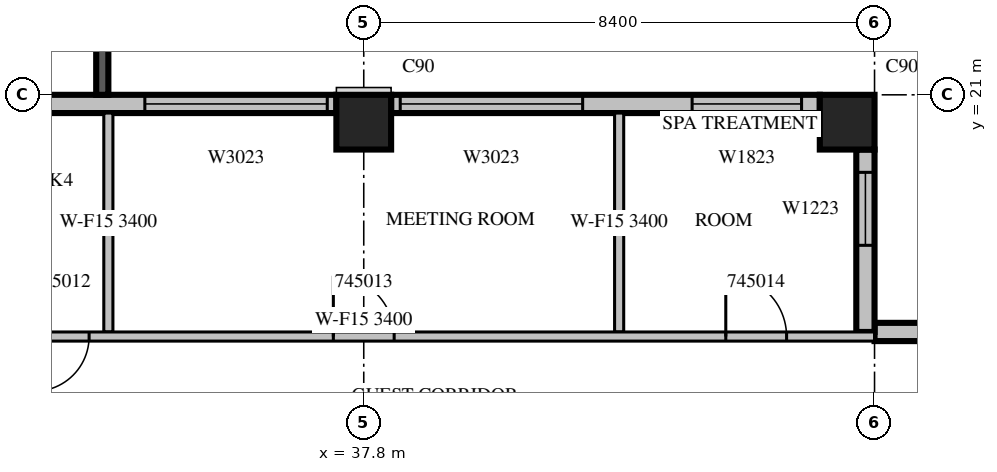
"""IFC4 building model, lengths in metres.
Left out: names, types, materials, properties, quantities, classifications, styles, units other than length and angle.
Written with IfcOpenShell. Run it as: python <this file> out.ifc"""

import sys

from ifc_helpers import new_model, si_unit, direction, frame, frame_2d, origin, origin_2d, place, context, subcontext, project, spatial, rectangle, extrude, source, transform, mapped, element, fill, save


model = new_model("IFC4")
c1 = context("Model", 3, precision=1e-05, world=origin(), true_north=direction((0.0, 1.0)))
c2 = subcontext(c1, "Body", "Model", "MODEL_VIEW")
j1 = project(units=[si_unit("LENGTHUNIT", "METRE"), si_unit("PLANEANGLEUNIT", "RADIAN")], contexts=[c1])
p1 = place(None, origin())
s1 = spatial("IfcSite", under=j1, at=p1, CompositionType="ELEMENT")
p2 = place(p1, origin())
s2 = spatial("IfcBuilding", under=s1, at=p2, CompositionType="ELEMENT")
p3 = place(p2, frame((0.0, 0.0, 204.4)))
s3 = spatial("IfcBuildingStorey", under=s2, at=p3, CompositionType="ELEMENT", Elevation=204.4)
m1 = source(origin(), c2, "Body", "SweptSolid", [
    extrude(rectangle(XDim=0.9, YDim=0.9, at=origin_2d()), origin(), (0.0, 0.0, 1.0), 3.8),
])
for number, where, z_axis, x_axis in (
    (1, (37.8, 20.55, 0.0), (0.0, 0.0, 1.0), (1.0, 0.0, 0.0)),
    (2, (45.75, 20.55, 0.0), (0.0, 0.0, 1.0), (1.0, 0.0, 0.0)),
):
    element("IfcColumn", number, at=place(p3, frame(where, z_axis=z_axis, x_axis=x_axis)), inside=s3, PredefinedType="COLUMN", context=c2, shape_type="MappedRepresentation", body=[
        mapped(m1, transform((0.0, 0.0, 0.0), scale=1.0)),
    ])
p4 = place(p3, frame((53.76, 17.1, 0.0), z_axis=(0.0, 0.0, 1.0), x_axis=(-1.0, 0.0, 0.0)))
e3 = element("IfcWall", 3, at=p4, inside=s3, PredefinedType="STANDARD", context=c2, shape_type="SweptSolid", body=[
    extrude(rectangle(XDim=7.56, YDim=0.3, at=frame_2d((3.78, 0.0))), origin(), (0.0, 0.0, 1.0), 3.4),
])
m2 = source(origin(), c2, "Body", "SweptSolid", [
    extrude(rectangle(XDim=3.6, YDim=2.3, at=frame_2d((1.8, 1.15))), frame((0.0, 0.16, 0.0), z_axis=(0.0, -1.0, 0.0), x_axis=(1.0, 0.0, 0.0)), (0.0, 0.0, 1.0), 0.32),
])
p5 = place(p4, frame((1.14, 0.0, 0.6)))
e4 = element("IfcOpeningElement", 4, at=p5, cuts=e3, PredefinedType="OPENING", context=c2, shape_type="MappedRepresentation", body=[
    mapped(m2, transform((0.0, 0.0, 0.0), scale=1.0)),
])
m3 = source(origin(), c2, "Body", "SweptSolid", [
    extrude(rectangle(XDim=3.0, YDim=0.3, at=frame_2d((1.5, 0.0))), origin(), (0.0, 0.0, 1.0), 3.4),
])
p6 = place(p3, frame((46.05, 17.1, 0.0), z_axis=(0.0, 0.0, 1.0), x_axis=(0.0, 1.0, 0.0)))
e5 = element("IfcWall", 5, at=p6, inside=s3, PredefinedType="STANDARD", context=c2, shape_type="MappedRepresentation", body=[
    mapped(m3, transform((0.0, 0.0, 0.0), scale=1.0)),
])
m4 = source(origin(), c2, "Body", "SweptSolid", [
    extrude(rectangle(XDim=1.2, YDim=2.3, at=frame_2d((0.6, 1.15))), frame((0.0, 0.16, 0.0), z_axis=(0.0, -1.0, 0.0), x_axis=(1.0, 0.0, 0.0)), (0.0, 0.0, 1.0), 0.32),
])
p7 = place(p6, frame((1.425, 0.0, 0.6)))
e6 = element("IfcOpeningElement", 6, at=p7, cuts=e5, PredefinedType="OPENING", context=c2, shape_type="MappedRepresentation", body=[
    mapped(m4, transform((0.0, 0.0, 0.0), scale=1.0)),
])
m5 = source(origin(), c2, "Body", "SweptSolid", [
    extrude(rectangle(XDim=7.05, YDim=0.3, at=frame_2d((3.525, 0.0))), origin(), (0.0, 0.0, 1.0), 3.4),
])
p8 = place(p3, frame((45.3, 20.85, 0.0), z_axis=(0.0, 0.0, 1.0), x_axis=(-1.0, 0.0, 0.0)))
e7 = element("IfcWall", 7, at=p8, inside=s3, PredefinedType="STANDARD", context=c2, shape_type="MappedRepresentation", body=[
    mapped(m5, transform((0.0, 0.0, 0.0), scale=1.0)),
])
m6 = source(origin(), c2, "Body", "SweptSolid", [
    extrude(rectangle(XDim=1.8, YDim=2.3, at=frame_2d((0.9, 1.15))), frame((0.0, 0.16, 0.0), z_axis=(0.0, -1.0, 0.0), x_axis=(1.0, 0.0, 0.0)), (0.0, 0.0, 1.0), 0.32),
])
p9 = place(p8, frame((0.3, 0.0, 0.6)))
e8 = element("IfcOpeningElement", 8, at=p9, cuts=e7, PredefinedType="OPENING", context=c2, shape_type="MappedRepresentation", body=[
    mapped(m6, transform((0.0, 0.0, 0.0), scale=1.0)),
])
m7 = source(origin(), c2, "Body", "SweptSolid", [
    extrude(rectangle(XDim=3.0, YDim=2.3, at=frame_2d((1.5, 1.15))), frame((0.0, 0.16, 0.0), z_axis=(0.0, -1.0, 0.0), x_axis=(1.0, 0.0, 0.0)), (0.0, 0.0, 1.0), 0.32),
])
p10 = place(p8, frame((3.9, 0.0, 0.6)))
e9 = element("IfcOpeningElement", 9, at=p10, cuts=e7, PredefinedType="OPENING", context=c2, shape_type="MappedRepresentation", body=[
    mapped(m7, transform((0.0, 0.0, 0.0), scale=1.0)),
])
m8 = source(origin(), c2, "Body", "SweptSolid", [
    extrude(rectangle(XDim=7.5, YDim=0.3, at=frame_2d((3.75, 0.0))), origin(), (0.0, 0.0, 1.0), 3.4),
])
p11 = place(p3, frame((37.35, 20.85, 0.0), z_axis=(0.0, 0.0, 1.0), x_axis=(-1.0, 0.0, 0.0)))
e10 = element("IfcWall", 10, at=p11, inside=s3, PredefinedType="STANDARD", context=c2, shape_type="MappedRepresentation", body=[
    mapped(m8, transform((0.0, 0.0, 0.0), scale=1.0)),
])
p12 = place(p11, frame((0.15, 0.0, 0.6)))
e11 = element("IfcOpeningElement", 11, at=p12, cuts=e10, PredefinedType="OPENING", context=c2, shape_type="MappedRepresentation", body=[
    mapped(m7, transform((0.0, 0.0, 0.0), scale=1.0)),
])
m9 = source(origin(), c2, "Body", "SweptSolid", [
    extrude(rectangle(XDim=1.0, YDim=2.1, at=frame_2d((0.5, 1.05))), frame((0.0, 0.16, 0.0), z_axis=(0.0, -1.0, 0.0), x_axis=(1.0, 0.0, 0.0)), (0.0, 0.0, 1.0), 0.32),
])
p13 = place(p11, frame((6.05, 0.0, 0.0)))
e12 = element("IfcOpeningElement", 12, at=p13, cuts=e10, PredefinedType="OPENING", context=c2, shape_type="MappedRepresentation", body=[
    mapped(m9, transform((0.0, 0.0, 0.0), scale=1.0)),
])
m10 = source(origin(), c2, "Body", "SweptSolid", [
    extrude(rectangle(XDim=3.9, YDim=0.2, at=frame_2d((1.95, 0.0))), origin(), (0.0, 0.0, 1.0), 3.39),
])
p14 = place(p3, frame((33.5, 21.0, 0.0), z_axis=(0.0, 0.0, 1.0), x_axis=(0.0, 1.0, 0.0)))
e13 = element("IfcWall", 13, at=p14, inside=s3, PredefinedType="SOLIDWALL", context=c2, shape_type="MappedRepresentation", body=[
    mapped(m10, transform((0.0, 0.0, 0.0), scale=1.0)),
])
m11 = source(origin(), c2, "Body", "SweptSolid", [
    extrude(rectangle(XDim=2.4, YDim=2.3, at=frame_2d((1.2, 1.15))), frame((0.0, 0.11, 0.0), z_axis=(0.0, -1.0, 0.0), x_axis=(1.0, 0.0, 0.0)), (0.0, 0.0, 1.0), 0.22),
])
p15 = place(p14, frame((0.75, 0.0, 0.6)))
e14 = element("IfcOpeningElement", 14, at=p15, cuts=e13, PredefinedType="OPENING", context=c2, shape_type="MappedRepresentation", body=[
    mapped(m11, transform((0.0, 0.0, 0.0), scale=1.0)),
])
m12 = source(origin(), c2, "Body", "SweptSolid", [
    extrude(rectangle(XDim=3.6, YDim=0.15, at=frame_2d((1.8, 0.0))), origin(), (0.0, 0.0, 1.0), 3.4),
])
for number, where, z_axis, x_axis in (
    (15, (33.6, 17.1, 0.0), (0.0, 0.0, 1.0), (0.0, 1.0, 0.0)),
    (16, (42.0, 17.1, 0.0), (0.0, 0.0, 1.0), (0.0, 1.0, 0.0)),
):
    element("IfcWall", number, at=place(p3, frame(where, z_axis=z_axis, x_axis=x_axis)), inside=s3, PredefinedType="PARTITIONING", context=c2, shape_type="MappedRepresentation", body=[
        mapped(m12, transform((0.0, 0.0, 0.0), scale=1.0)),
    ])
p16 = place(p3, frame((29.4, 17.025, 0.0), z_axis=(0.0, 0.0, 1.0), x_axis=(1.0, 0.0, 0.0)))
e17 = element("IfcWall", 17, at=p16, inside=s3, PredefinedType="PARTITIONING", context=c2, shape_type="SweptSolid", body=[
    extrude(rectangle(XDim=16.8, YDim=0.15, at=frame_2d((8.4, 0.0))), origin(), (0.0, 0.0, 1.0), 3.4),
])
m13 = source(origin(), c2, "Body", "SweptSolid", [
    extrude(rectangle(XDim=0.9, YDim=2.1, at=frame_2d((0.45, 1.05))), frame((0.0, 0.085, 0.0), z_axis=(0.0, -1.0, 0.0), x_axis=(1.0, 0.0, 0.0)), (0.0, 0.0, 1.0), 0.17),
])
p17 = place(p16, frame((0.883, 0.0, 0.0)))
e18 = element("IfcOpeningElement", 18, at=p17, cuts=e17, PredefinedType="OPENING", context=c2, shape_type="MappedRepresentation", body=[
    mapped(m13, transform((0.0, 0.0, 0.0), scale=1.0)),
])
p18 = place(p16, frame((2.983, 0.0, 0.0)))
e19 = element("IfcOpeningElement", 19, at=p18, cuts=e17, PredefinedType="OPENING", context=c2, shape_type="MappedRepresentation", body=[
    mapped(m13, transform((0.0, 0.0, 0.0), scale=1.0)),
])
m14 = source(origin(), c2, "Body", "SweptSolid", [
    extrude(rectangle(XDim=1.0, YDim=2.1, at=frame_2d((0.5, 1.05))), frame((0.0, 0.085, 0.0), z_axis=(0.0, -1.0, 0.0), x_axis=(1.0, 0.0, 0.0)), (0.0, 0.0, 1.0), 0.17),
])
p19 = place(p16, frame((7.9, 0.0, 0.0)))
e20 = element("IfcOpeningElement", 20, at=p19, cuts=e17, PredefinedType="OPENING", context=c2, shape_type="MappedRepresentation", body=[
    mapped(m14, transform((0.0, 0.0, 0.0), scale=1.0)),
])
p20 = place(p16, frame((14.354, 0.0, 0.0)))
e21 = element("IfcOpeningElement", 21, at=p20, cuts=e17, PredefinedType="OPENING", context=c2, shape_type="MappedRepresentation", body=[
    mapped(m14, transform((0.0, 0.0, 0.0), scale=1.0)),
])
m15 = source(origin(), c2, "Body", "SweptSolid", [
    extrude(rectangle(XDim=1.2, YDim=2.3, at=frame_2d((0.6, 1.15))), frame((0.0, 0.03, 0.0), z_axis=(0.0, -1.0, 0.0), x_axis=(1.0, 0.0, 0.0)), (0.0, 0.0, 1.0), 0.06),
])
p21 = place(p7, origin())
e22 = element("IfcWindow", 22, at=p21, inside=s3, PartitioningType="SINGLE_PANEL", PredefinedType="WINDOW", context=c2, shape_type="MappedRepresentation", body=[
    mapped(m15, transform((0.0, 0.0, 0.0), scale=1.0)),
])
fill(e6, e22)
m16 = source(origin(), c2, "Body", "SweptSolid", [
    extrude(rectangle(XDim=1.8, YDim=2.3, at=frame_2d((0.9, 1.15))), frame((0.0, 0.03, 0.0), z_axis=(0.0, -1.0, 0.0), x_axis=(1.0, 0.0, 0.0)), (0.0, 0.0, 1.0), 0.06),
])
p22 = place(p9, origin())
e23 = element("IfcWindow", 23, at=p22, inside=s3, PartitioningType="SINGLE_PANEL", PredefinedType="WINDOW", context=c2, shape_type="MappedRepresentation", body=[
    mapped(m16, transform((0.0, 0.0, 0.0), scale=1.0)),
])
fill(e8, e23)
m17 = source(origin(), c2, "Body", "SweptSolid", [
    extrude(rectangle(XDim=3.0, YDim=2.3, at=frame_2d((1.5, 1.15))), frame((0.0, 0.03, 0.0), z_axis=(0.0, -1.0, 0.0), x_axis=(1.0, 0.0, 0.0)), (0.0, 0.0, 1.0), 0.06),
])
p23 = place(p10, origin())
e24 = element("IfcWindow", 24, at=p23, inside=s3, PartitioningType="SINGLE_PANEL", PredefinedType="WINDOW", context=c2, shape_type="MappedRepresentation", body=[
    mapped(m17, transform((0.0, 0.0, 0.0), scale=1.0)),
])
fill(e9, e24)
p24 = place(p12, origin())
e25 = element("IfcWindow", 25, at=p24, inside=s3, PartitioningType="SINGLE_PANEL", PredefinedType="WINDOW", context=c2, shape_type="MappedRepresentation", body=[
    mapped(m17, transform((0.0, 0.0, 0.0), scale=1.0)),
])
fill(e11, e25)
m18 = source(origin(), c2, "Body", "SweptSolid", [
    extrude(rectangle(XDim=0.9, YDim=2.1, at=frame_2d((0.45, 1.05))), frame((0.0, 0.025, 0.0), z_axis=(0.0, -1.0, 0.0), x_axis=(1.0, 0.0, 0.0)), (0.0, 0.0, 1.0), 0.05),
])
p25 = place(p18, origin())
e26 = element("IfcDoor", 26, at=p25, inside=s3, OperationType="SINGLE_SWING_RIGHT", PredefinedType="DOOR", context=c2, shape_type="MappedRepresentation", body=[
    mapped(m18, transform((0.0, 0.0, 0.0), scale=1.0)),
])
fill(e19, e26)
m19 = source(origin(), c2, "Body", "SweptSolid", [
    extrude(rectangle(XDim=1.0, YDim=2.1, at=frame_2d((0.5, 1.05))), frame((0.0, 0.025, 0.0), z_axis=(0.0, -1.0, 0.0), x_axis=(1.0, 0.0, 0.0)), (0.0, 0.0, 1.0), 0.05),
])
p26 = place(p19, origin())
e27 = element("IfcDoor", 27, at=p26, inside=s3, OperationType="SINGLE_SWING_LEFT", PredefinedType="DOOR", context=c2, shape_type="MappedRepresentation", body=[
    mapped(m19, transform((0.0, 0.0, 0.0), scale=1.0)),
])
fill(e20, e27)
p27 = place(p20, origin())
e28 = element("IfcDoor", 28, at=p27, inside=s3, OperationType="SINGLE_SWING_LEFT", PredefinedType="DOOR", context=c2, shape_type="MappedRepresentation", body=[
    mapped(m19, transform((0.0, 0.0, 0.0), scale=1.0)),
])
fill(e21, e28)
save(model, sys.argv[1])
